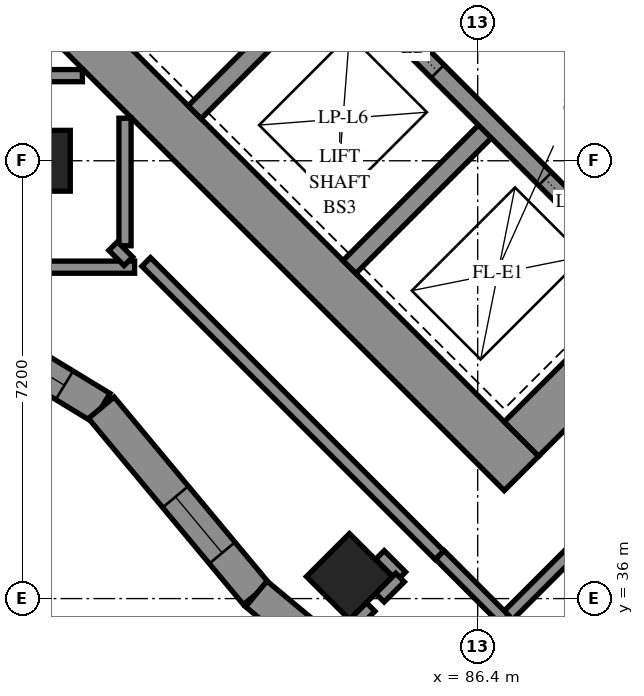
"""IFC4 building model, lengths in metres.
Left out: names, types, materials, properties, quantities, classifications, styles, units other than length and angle.
Written with IfcOpenShell. Run it as: python <this file> out.ifc"""

import sys

from ifc_helpers import new_model, si_unit, direction, frame, frame_2d, origin, origin_2d, place, context, subcontext, project, spatial, polyline, rectangle, outline, extrude, element, fill, save


model = new_model("IFC4")
c1 = context("Model", 3, precision=1e-05, world=origin(), true_north=direction((0.0, 1.0)))
c2 = subcontext(c1, "Body", "Model", "MODEL_VIEW")
j1 = project(units=[si_unit("LENGTHUNIT", "METRE"), si_unit("PLANEANGLEUNIT", "RADIAN")], contexts=[c1])
p1 = place(None, origin())
s1 = spatial("IfcSite", under=j1, at=p1, CompositionType="ELEMENT")
p2 = place(p1, origin())
s2 = spatial("IfcBuilding", under=s1, at=p2, CompositionType="ELEMENT")
p3 = place(p2, frame((0.0, 0.0, 88.0)))
s3 = spatial("IfcBuildingStorey", under=s2, at=p3, CompositionType="ELEMENT", Elevation=88.0)
for number, where, z_axis, x_axis in (
    (1, (79.2, 43.2, 0.0), (0.0, 0.0, 1.0), (1.0, 0.0, 0.0)),
    (2, (84.291, 36.362, 0.0), (0.0, 0.0, 1.0), (0.707, -0.707, 0.0)),
):
    element("IfcColumn", number, at=place(p3, frame(where, z_axis=z_axis, x_axis=x_axis)), inside=s3, PredefinedType="COLUMN", context=c2, shape_type="SweptSolid", body=[
        extrude(rectangle(XDim=1.0, YDim=1.0, at=origin_2d()), origin(), (0.0, 0.0, 1.0), 3.1),
    ])
p4 = place(p3, frame((75.806, 49.373, -0.3), z_axis=(0.0, 0.0, 1.0), x_axis=(0.7071067812, -0.7071067812, 0.0)))
e3 = element("IfcWall", 3, at=p4, inside=s3, PredefinedType="SHEAR", context=c2, shape_type="SweptSolid", body=[
    extrude(rectangle(XDim=16.0, YDim=0.8, at=frame_2d((8.0, 0.0))), origin(), (0.0, 0.0, 1.0), 2.7),
])
p5 = place(p3, frame((87.12, 38.625, -0.3), z_axis=(0.0, 0.0, 1.0), x_axis=(0.7071067812, 0.7071067812, 0.0)))
e4 = element("IfcWall", 4, at=p5, inside=s3, PredefinedType="SHEAR", context=c2, shape_type="SweptSolid", body=[
    extrude(rectangle(XDim=14.4, YDim=0.8, at=frame_2d((7.2, 0.0))), origin(), (0.0, 0.0, 1.0), 2.7),
])
p6 = place(p5, frame((4.55, 0.0, 0.3)))
e5 = element("IfcOpeningElement", 5, at=p6, cuts=e4, PredefinedType="OPENING", context=c2, shape_type="SweptSolid", body=[
    extrude(rectangle(XDim=1.1, YDim=2.1, at=frame_2d((0.55, 1.05))), frame((0.0, 0.41, 0.0), z_axis=(0.0, -1.0, 0.0), x_axis=(1.0, 0.0, 0.0)), (0.0, 0.0, 1.0), 0.82),
])
p7 = place(p5, frame((11.35, 0.0, 0.3)))
e6 = element("IfcOpeningElement", 6, at=p7, cuts=e4, PredefinedType="OPENING", context=c2, shape_type="SweptSolid", body=[
    extrude(rectangle(XDim=1.1, YDim=2.1, at=frame_2d((0.55, 1.05))), frame((0.0, 0.41, 0.0), z_axis=(0.0, -1.0, 0.0), x_axis=(1.0, 0.0, 0.0)), (0.0, 0.0, 1.0), 0.82),
])
for number, where, z_axis, x_axis in (
    (7, (81.746, 43.999, 0.0), (0.0, 0.0, 1.0), (0.707, 0.707, 0.0)),
    (8, (84.291, 41.453, 0.0), (0.0, 0.0, 1.0), (0.707, 0.707, 0.0)),
):
    element("IfcWall", number, at=place(p3, frame(where, z_axis=z_axis, x_axis=x_axis)), inside=s3, PredefinedType="SOLIDWALL", context=c2, shape_type="SweptSolid", body=[
        extrude(rectangle(XDim=3.3, YDim=0.3, at=frame_2d((1.65, 0.0))), origin(), (0.0, 0.0, 1.0), 3.1),
    ])
p8 = place(p3, frame((78.988, 51.423, 0.0), z_axis=(0.0, 0.0, 1.0), x_axis=(0.7071067812, -0.7071067812, 0.0)))
e9 = element("IfcWall", 9, at=p8, inside=s3, PredefinedType="SOLIDWALL", context=c2, shape_type="SweptSolid", body=[
    extrude(rectangle(XDim=14.4, YDim=0.3, at=frame_2d((7.2, 0.0))), origin(), (0.0, 0.0, 1.0), 3.1),
])
p9 = place(p8, frame((1.25, 0.0, 0.0)))
e10 = element("IfcOpeningElement", 10, at=p9, cuts=e9, PredefinedType="OPENING", context=c2, shape_type="SweptSolid", body=[
    extrude(rectangle(XDim=1.1, YDim=2.1, at=frame_2d((0.55, 1.05))), frame((0.0, 0.16, 0.0), z_axis=(0.0, -1.0, 0.0), x_axis=(1.0, 0.0, 0.0)), (0.0, 0.0, 1.0), 0.32),
])
p10 = place(p8, frame((4.85, 0.0, 0.0)))
e11 = element("IfcOpeningElement", 11, at=p10, cuts=e9, PredefinedType="OPENING", context=c2, shape_type="SweptSolid", body=[
    extrude(rectangle(XDim=1.1, YDim=2.1, at=frame_2d((0.55, 1.05))), frame((0.0, 0.16, 0.0), z_axis=(0.0, -1.0, 0.0), x_axis=(1.0, 0.0, 0.0)), (0.0, 0.0, 1.0), 0.32),
])
p11 = place(p8, frame((8.45, 0.0, 0.0)))
e12 = element("IfcOpeningElement", 12, at=p11, cuts=e9, PredefinedType="OPENING", context=c2, shape_type="SweptSolid", body=[
    extrude(rectangle(XDim=1.1, YDim=2.1, at=frame_2d((0.55, 1.05))), frame((0.0, 0.16, 0.0), z_axis=(0.0, -1.0, 0.0), x_axis=(1.0, 0.0, 0.0)), (0.0, 0.0, 1.0), 0.32),
])
p12 = place(p8, frame((12.05, 0.0, 0.0)))
e13 = element("IfcOpeningElement", 13, at=p12, cuts=e9, PredefinedType="OPENING", context=c2, shape_type="SweptSolid", body=[
    extrude(rectangle(XDim=1.1, YDim=2.1, at=frame_2d((0.55, 1.05))), frame((0.0, 0.16, 0.0), z_axis=(0.0, -1.0, 0.0), x_axis=(1.0, 0.0, 0.0)), (0.0, 0.0, 1.0), 0.32),
])
p13 = place(p3, frame((81.534, 53.969, 0.0), z_axis=(0.0, 0.0, 1.0), x_axis=(0.707103309, -0.7071102534, 0.0)))
e14 = element("IfcWall", 14, at=p13, inside=s3, PredefinedType="SOLIDWALL", context=c2, shape_type="SweptSolid", body=[
    extrude(rectangle(XDim=14.4, YDim=0.3, at=frame_2d((7.2, 0.0))), origin(), (0.0, 0.0, 1.0), 3.1),
])
p14 = place(p13, frame((12.05, 0.0, 0.0)))
e15 = element("IfcOpeningElement", 15, at=p14, cuts=e14, PredefinedType="OPENING", context=c2, shape_type="SweptSolid", body=[
    extrude(rectangle(XDim=1.1, YDim=2.1, at=frame_2d((0.55, 1.05))), frame((0.0, 0.16, 0.0), z_axis=(0.0, -1.0, 0.0), x_axis=(1.0, 0.0, 0.0)), (0.0, 0.0, 1.0), 0.32),
])
p15 = place(p3, frame((76.669, 41.294, 0.0), z_axis=(0.0, 0.0, 1.0), x_axis=(0.8543182431, -0.5197502664, 0.0)))
e16 = element("IfcWall", 16, at=p15, inside=s3, PredefinedType="SOLIDWALL", context=c2, shape_type="SweptSolid", body=[
    extrude(outline(polyline([(0.038, -0.275), (4.1, -0.275), (4.192, 0.275), (-0.038, 0.275), (0.038, -0.275)])), origin(), (0.0, 0.0, 1.0), 3.1),
])
p16 = place(p15, frame((0.363, 0.0, 0.5)))
e17 = element("IfcOpeningElement", 17, at=p16, cuts=e16, PredefinedType="OPENING", context=c2, shape_type="SweptSolid", body=[
    extrude(rectangle(XDim=1.2, YDim=2.45, at=frame_2d((0.6, 1.225))), frame((0.0, 0.285, 0.0), z_axis=(0.0, -1.0, 0.0), x_axis=(1.0, 0.0, 0.0)), (0.0, 0.0, 1.0), 0.57),
])
p17 = place(p15, frame((2.236, 0.0, 0.5)))
e18 = element("IfcOpeningElement", 18, at=p17, cuts=e16, PredefinedType="OPENING", context=c2, shape_type="SweptSolid", body=[
    extrude(rectangle(XDim=1.2, YDim=2.45, at=frame_2d((0.6, 1.225))), frame((0.0, 0.285, 0.0), z_axis=(0.0, -1.0, 0.0), x_axis=(1.0, 0.0, 0.0)), (0.0, 0.0, 1.0), 0.57),
])
p18 = place(p3, frame((80.21, 39.139, 0.0), z_axis=(0.0, 0.0, 1.0), x_axis=(0.639762137, -0.7685729686, 0.0)))
e19 = element("IfcWall", 19, at=p18, inside=s3, PredefinedType="SOLIDWALL", context=c2, shape_type="SweptSolid", body=[
    extrude(outline(polyline([(0.046, -0.275), (4.009, -0.275), (3.959, 0.275), (-0.046, 0.275), (0.046, -0.275)])), origin(), (0.0, 0.0, 1.0), 3.1),
])
p19 = place(p18, frame((1.907, 0.0, 0.5)))
e20 = element("IfcOpeningElement", 20, at=p19, cuts=e19, PredefinedType="OPENING", context=c2, shape_type="SweptSolid", body=[
    extrude(rectangle(XDim=1.2, YDim=2.45, at=frame_2d((0.6, 1.225))), frame((0.0, 0.285, 0.0), z_axis=(0.0, -1.0, 0.0), x_axis=(1.0, 0.0, 0.0)), (0.0, 0.0, 1.0), 0.57),
])
p20 = place(p3, frame((82.759, 36.077, 0.0), z_axis=(0.0, 0.0, 1.0), x_axis=(0.7685810075, -0.6397524794, 0.0)))
e21 = element("IfcWall", 21, at=p20, inside=s3, PredefinedType="SOLIDWALL", context=c2, shape_type="SweptSolid", body=[
    extrude(outline(polyline([(-0.025, -0.275), (3.938, -0.275), (3.989, 0.275), (0.025, 0.275), (-0.025, -0.275)])), origin(), (0.0, 0.0, 1.0), 3.1),
])
p21 = place(p20, frame((1.724, 0.0, 0.5)))
e22 = element("IfcOpeningElement", 22, at=p21, cuts=e21, PredefinedType="OPENING", context=c2, shape_type="SweptSolid", body=[
    extrude(rectangle(XDim=1.2, YDim=2.45, at=frame_2d((0.6, 1.225))), frame((0.0, 0.285, 0.0), z_axis=(0.0, -1.0, 0.0), x_axis=(1.0, 0.0, 0.0)), (0.0, 0.0, 1.0), 0.57),
])
p22 = place(p3, frame((86.835, 35.655, 0.0), z_axis=(0.0, 0.0, 1.0), x_axis=(0.7071067812, 0.7071067812, 0.0)))
e23 = element("IfcWall", 23, at=p22, inside=s3, PredefinedType="PARTITIONING", context=c2, shape_type="SweptSolid", body=[
    extrude(rectangle(XDim=8.451, YDim=0.2, at=frame_2d((4.226, 0.0))), origin(), (0.0, 0.0, 1.0), 3.1),
])
p23 = place(p22, frame((7.192, 0.0, 0.0)))
e24 = element("IfcOpeningElement", 24, at=p23, cuts=e23, PredefinedType="OPENING", context=c2, shape_type="SweptSolid", body=[
    extrude(rectangle(XDim=1.0, YDim=2.1, at=frame_2d((0.5, 1.05))), frame((0.0, 0.11, 0.0), z_axis=(0.0, -1.0, 0.0), x_axis=(1.0, 0.0, 0.0)), (0.0, 0.0, 1.0), 0.22),
])
p24 = place(p3, frame((86.347, 33.321, 0.0), z_axis=(0.0, 0.0, 1.0), x_axis=(0.706982505, 0.7072310356, 0.0)))
e25 = element("IfcWall", 25, at=p24, inside=s3, PredefinedType="PARTITIONING", context=c2, shape_type="SweptSolid", body=[
    extrude(rectangle(XDim=8.047, YDim=0.2, at=frame_2d((4.024, 0.0))), origin(), (0.0, 0.0, 1.0), 3.1),
])
p25 = place(p3, frame((80.948, 41.536, 0.0), z_axis=(0.0, 0.0, 1.0), x_axis=(0.7071067812, -0.7071067812, 0.0)))
e26 = element("IfcWall", 26, at=p25, inside=s3, PredefinedType="PARTITIONING", context=c2, shape_type="SweptSolid", body=[
    extrude(rectangle(XDim=6.822, YDim=0.2, at=frame_2d((3.411, 0.0))), origin(), (0.0, 0.0, 1.0), 3.1),
])
for number, where, z_axis, x_axis in (
    (27, (77.802, 44.6, 0.0), (0.0, 0.0, 1.0), (1.0, 0.0, 0.0)),
    (28, (80.6, 41.802, 0.0), (0.0, 0.0, 1.0), (0.0, 1.0, 0.0)),
):
    element("IfcWall", number, at=place(p3, frame(where, z_axis=z_axis, x_axis=x_axis)), inside=s3, PredefinedType="PARTITIONING", context=c2, shape_type="SweptSolid", body=[
        extrude(rectangle(XDim=2.098, YDim=0.2, at=frame_2d((1.049, 0.0))), origin(), (0.0, 0.0, 1.0), 3.1),
    ])
p26 = place(p3, frame((79.198, 41.45, 0.0), z_axis=(0.0, 0.0, 1.0), x_axis=(1.0, 0.0, 0.0)))
e29 = element("IfcWall", 29, at=p26, inside=s3, PredefinedType="PARTITIONING", context=c2, shape_type="SweptSolid", body=[
    extrude(rectangle(XDim=1.56, YDim=0.2, at=frame_2d((0.78, 0.0))), origin(), (0.0, 0.0, 1.0), 3.1),
])
p27 = place(p3, frame((85.778, 36.718, 0.0), z_axis=(0.0, 0.0, 1.0), x_axis=(0.7064400143, -0.70777292, 0.0)))
e30 = element("IfcWall", 30, at=p27, inside=s3, PredefinedType="PARTITIONING", context=c2, shape_type="SweptSolid", body=[
    extrude(rectangle(XDim=1.5, YDim=0.2, at=frame_2d((0.75, 0.0))), origin(), (0.0, 0.0, 1.0), 3.1),
])
p28 = place(p3, frame((84.097, 35.321, 0.0), z_axis=(0.0, 0.0, 1.0), x_axis=(0.7071067812, 0.7071067812, 0.0)))
e31 = element("IfcWall", 31, at=p28, inside=s3, PredefinedType="PARTITIONING", context=c2, shape_type="SweptSolid", body=[
    extrude(rectangle(XDim=0.766, YDim=0.2, at=frame_2d((0.383, 0.0))), origin(), (0.0, 0.0, 1.0), 3.1),
])
p29 = place(p3, frame((84.792, 36.718, 0.0), z_axis=(0.0, 0.0, 1.0), x_axis=(0.7071067812, -0.7071067812, 0.0)))
e32 = element("IfcWall", 32, at=p29, inside=s3, PredefinedType="PARTITIONING", context=c2, shape_type="SweptSolid", body=[
    extrude(rectangle(XDim=0.498, YDim=0.2, at=frame_2d((0.249, 0.0))), origin(), (0.0, 0.0, 1.0), 3.1),
])
p30 = place(p3, frame((84.791, 36.015, 0.0), z_axis=(0.0, 0.0, 1.0), x_axis=(0.7071067812, 0.7071067812, 0.0)))
e33 = element("IfcWall", 33, at=p30, inside=s3, PredefinedType="PARTITIONING", context=c2, shape_type="SweptSolid", body=[
    extrude(rectangle(XDim=0.468, YDim=0.2, at=frame_2d((0.234, 0.0))), origin(), (0.0, 0.0, 1.0), 3.1),
])
p31 = place(p3, frame((80.405, 41.797, 0.0), z_axis=(0.0, 0.0, 1.0), x_axis=(0.7071067812, -0.7071067812, 0.0)))
e34 = element("IfcWall", 34, at=p31, inside=s3, PredefinedType="PARTITIONING", context=c2, shape_type="SweptSolid", body=[
    extrude(rectangle(XDim=0.355, YDim=0.2, at=frame_2d((0.177, 0.0))), origin(), (0.0, 0.0, 1.0), 3.1),
])
p32 = place(p17, origin())
e35 = element("IfcWindow", 35, at=p32, inside=s3, PartitioningType="SINGLE_PANEL", PredefinedType="WINDOW", context=c2, shape_type="SweptSolid", body=[
    extrude(rectangle(XDim=1.2, YDim=2.45, at=frame_2d((0.6, 1.225))), frame((0.0, 0.155, 0.0), z_axis=(0.0, -1.0, 0.0), x_axis=(1.0, 0.0, 0.0)), (0.0, 0.0, 1.0), 0.06),
])
fill(e18, e35)
p33 = place(p19, origin())
e36 = element("IfcWindow", 36, at=p33, inside=s3, PartitioningType="SINGLE_PANEL", PredefinedType="WINDOW", context=c2, shape_type="SweptSolid", body=[
    extrude(rectangle(XDim=1.2, YDim=2.45, at=frame_2d((0.6, 1.225))), frame((0.0, 0.155, 0.0), z_axis=(0.0, -1.0, 0.0), x_axis=(1.0, 0.0, 0.0)), (0.0, 0.0, 1.0), 0.06),
])
fill(e20, e36)
p34 = place(p11, origin())
e37 = element("IfcDoor", 37, at=p34, inside=s3, OperationType="SLIDING_TO_LEFT", PredefinedType="DOOR", context=c2, shape_type="SweptSolid", body=[
    extrude(rectangle(XDim=1.1, YDim=2.1, at=frame_2d((0.55, 1.05))), frame((0.0, 0.025, 0.0), z_axis=(0.0, -1.0, 0.0), x_axis=(1.0, 0.0, 0.0)), (0.0, 0.0, 1.0), 0.05),
])
fill(e12, e37)
p35 = place(p12, origin())
e38 = element("IfcDoor", 38, at=p35, inside=s3, OperationType="SLIDING_TO_RIGHT", PredefinedType="DOOR", context=c2, shape_type="SweptSolid", body=[
    extrude(rectangle(XDim=1.1, YDim=2.1, at=frame_2d((0.55, 1.05))), frame((0.0, 0.025, 0.0), z_axis=(0.0, -1.0, 0.0), x_axis=(1.0, 0.0, 0.0)), (0.0, 0.0, 1.0), 0.05),
])
fill(e13, e38)
save(model, sys.argv[1])
